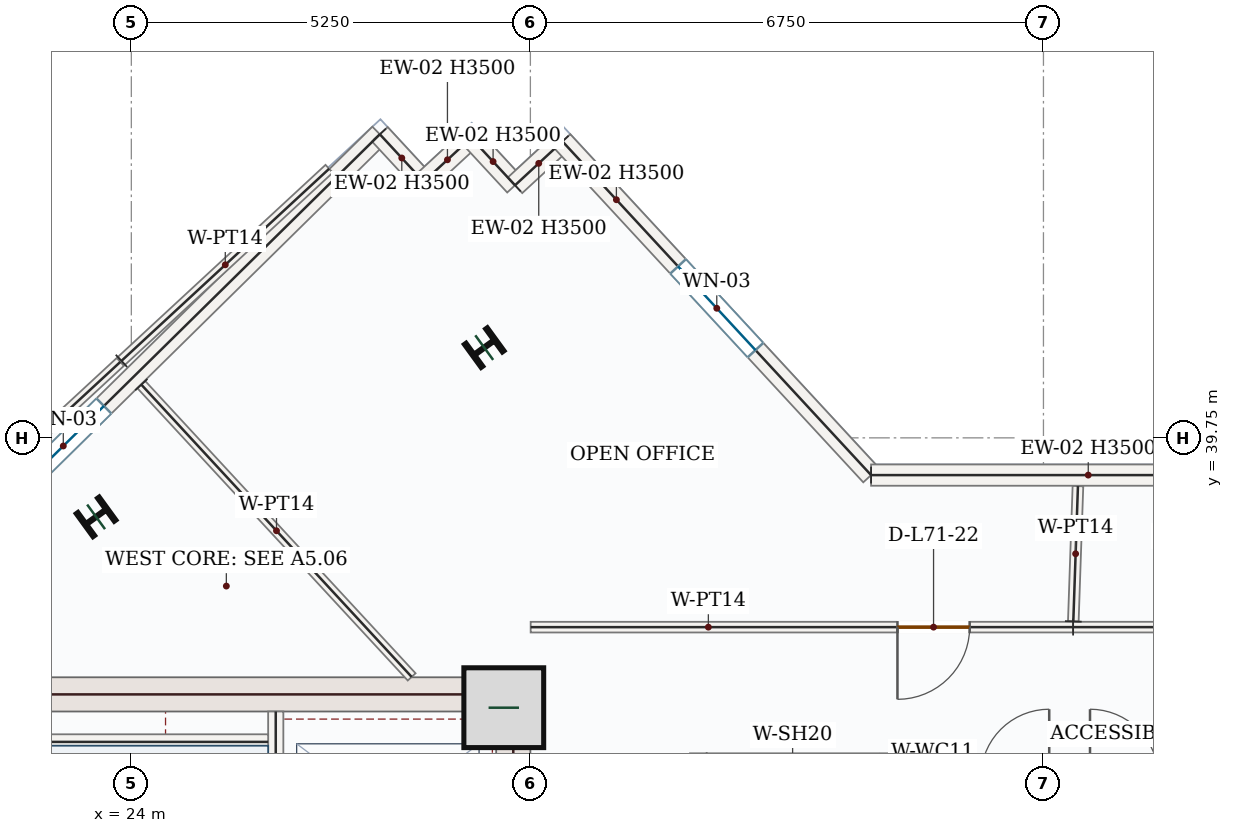
"""IFC4 building model, lengths in metres.
Left out: names, types, materials, properties, quantities, classifications, styles, units other than length and angle.
Written with IfcOpenShell. Run it as: python <this file> out.ifc"""

import sys

from ifc_helpers import new_model, si_unit, direction, frame, frame_2d, origin, origin_2d, place, context, subcontext, project, spatial, rectangle, i_section, extrude, source, transform, mapped, element, fill, save


model = new_model("IFC4")
c1 = context("Model", 3, precision=1e-05, world=origin(), true_north=direction((0.0, 1.0)))
c2 = subcontext(c1, "Body", "Model", "MODEL_VIEW")
j1 = project(units=[si_unit("LENGTHUNIT", "METRE"), si_unit("PLANEANGLEUNIT", "RADIAN")], contexts=[c1])
p1 = place(None, origin())
s1 = spatial("IfcSite", under=j1, at=p1, CompositionType="ELEMENT")
p2 = place(p1, origin())
s2 = spatial("IfcBuilding", under=s1, at=p2, CompositionType="ELEMENT")
p3 = place(p2, frame((0.0, 0.0, 295.35)))
s3 = spatial("IfcBuildingStorey", under=s2, at=p3, CompositionType="ELEMENT", Elevation=295.35)
p4 = place(p3, frame((29.025, 28.05, 0.0), z_axis=(0.0, 0.0, 1.0), x_axis=(0.0, 1.0, 0.0)))
e1 = element("IfcWall", 1, at=p4, inside=s3, PredefinedType="SHEAR", context=c2, shape_type="SweptSolid", body=[
    extrude(rectangle(XDim=8.55, YDim=0.45, at=frame_2d((4.275, 0.0))), origin(), (0.0, 0.0, 1.0), 3.5),
])
p5 = place(p4, frame((1.5, 0.0, 0.0)))
e2 = element("IfcOpeningElement", 2, at=p5, cuts=e1, PredefinedType="OPENING", context=c2, shape_type="SweptSolid", body=[
    extrude(rectangle(XDim=1.1, YDim=2.2, at=frame_2d((0.55, 1.1))), frame((0.0, 0.235, 0.0), z_axis=(0.0, -1.0, 0.0), x_axis=(1.0, 0.0, 0.0)), (0.0, 0.0, 1.0), 0.47),
])
m1 = source(origin(), c2, "Body", "SweptSolid", [
    extrude(rectangle(XDim=7.1, YDim=0.45, at=frame_2d((3.55, 0.0))), origin(), (0.0, 0.0, 1.0), 3.5),
])
p6 = place(p3, frame((21.7, 36.375, 0.0), z_axis=(0.0, 0.0, 1.0), x_axis=(1.0, 0.0, 0.0)))
e3 = element("IfcWall", 3, at=p6, inside=s3, PredefinedType="SHEAR", context=c2, shape_type="MappedRepresentation", body=[
    mapped(m1, transform((0.0, 0.0, 0.0), x_axis=(1.0, 0.0, 0.0), y_axis=(0.0, 1.0, 0.0), z_axis=(0.0, 0.0, 1.0), scale=1.0)),
])
m2 = source(origin(), c2, "Body", "SweptSolid", [
    extrude(rectangle(XDim=1.05, YDim=1.05, at=origin_2d()), origin(), (0.0, 0.0, 1.0), 3.75),
])
p7 = place(p3, frame((28.9, 36.2, 0.0), z_axis=(0.0, 0.0, 1.0), x_axis=(1.0, 0.0, 0.0)))
e4 = element("IfcColumn", 4, at=p7, inside=s3, PredefinedType="COLUMN", context=c2, shape_type="MappedRepresentation", body=[
    mapped(m2, transform((0.0, 0.0, 0.0), x_axis=(1.0, 0.0, 0.0), y_axis=(0.0, 1.0, 0.0), z_axis=(0.0, 0.0, 1.0), scale=1.0)),
])
m3 = source(origin(), c2, "Body", "SweptSolid", [
    extrude(i_section(OverallWidth=0.374, OverallDepth=0.372, WebThickness=0.016, FlangeThickness=0.026, FilletRadius=0.018, at=origin_2d()), origin(), (0.0, 0.0, 1.0), 3.75),
])
for number, where, z_axis, x_axis in (
    (5, (28.643, 40.937, 0.0), (0.0, 0.0, 1.0), (-0.588, 0.809, 0.0)),
    (6, (23.536, 38.711, 0.0), (0.0, 0.0, 1.0), (-0.588, 0.809, 0.0)),
):
    element("IfcColumn", number, at=place(p3, frame(where, z_axis=z_axis, x_axis=x_axis)), inside=s3, PredefinedType="COLUMN", context=c2, shape_type="MappedRepresentation", body=[
        mapped(m3, transform((0.0, 0.0, 0.0), x_axis=(1.0, 0.0, 0.0), y_axis=(0.0, 1.0, 0.0), z_axis=(0.0, 0.0, 1.0), scale=1.0)),
    ])
p8 = place(p3, frame((18.94, 35.542, 0.0), z_axis=(0.0, 0.0, 1.0), x_axis=(0.712557502542, 0.701613715353, 0.0)))
e7 = element("IfcWall", 7, at=p8, inside=s3, PredefinedType="SOLIDWALL", context=c2, shape_type="SweptSolid", body=[
    extrude(rectangle(XDim=11.69, YDim=0.28, at=frame_2d((5.845, 0.0))), origin(), (0.0, 0.0, 1.0), 3.5),
])
p9 = place(p8, frame((5.095, 0.0, 0.85)))
e8 = element("IfcOpeningElement", 8, at=p9, cuts=e7, PredefinedType="OPENING", context=c2, shape_type="SweptSolid", body=[
    extrude(rectangle(XDim=1.5, YDim=1.5, at=frame_2d((0.75, 0.75))), frame((0.0, 0.15, 0.0), z_axis=(0.0, -1.0, 0.0), x_axis=(1.0, 0.0, 0.0)), (0.0, 0.0, 1.0), 0.3),
])
m4 = source(origin(), c2, "Body", "SweptSolid", [
    extrude(rectangle(XDim=0.85, YDim=0.28, at=frame_2d((0.425, 0.0))), origin(), (0.0, 0.0, 1.0), 3.5),
])
for number, where, z_axis, x_axis in (
    (9, (27.27, 43.744, 0.0), (0.0, 0.0, 1.0), (0.679, -0.734, 0.0)),
    (10, (27.847, 43.12, 0.0), (0.0, 0.0, 1.0), (0.734, 0.679, 0.0)),
    (11, (28.471, 43.697, 0.0), (0.0, 0.0, 1.0), (0.679, -0.734, 0.0)),
):
    element("IfcWall", number, at=place(p3, frame(where, z_axis=z_axis, x_axis=x_axis)), inside=s3, PredefinedType="SOLIDWALL", context=c2, shape_type="MappedRepresentation", body=[
        mapped(m4, transform((0.0, 0.0, 0.0), x_axis=(1.0, 0.0, 0.0), y_axis=(0.0, 1.0, 0.0), z_axis=(0.0, 0.0, 1.0), scale=1.0)),
    ])
m5 = source(origin(), c2, "Body", "SweptSolid", [
    extrude(rectangle(XDim=0.85, YDim=0.28, at=frame_2d((0.425, 0.0))), origin(), (0.0, 0.0, 1.0), 3.5),
])
p10 = place(p3, frame((29.048, 43.073, 0.0), z_axis=(0.0, 0.0, 1.0), x_axis=(0.73428557742, 0.678840696183, 0.0)))
e12 = element("IfcWall", 12, at=p10, inside=s3, PredefinedType="SOLIDWALL", context=c2, shape_type="MappedRepresentation", body=[
    mapped(m5, transform((0.0, 0.0, 0.0), x_axis=(1.0, 0.0, 0.0), y_axis=(0.0, 1.0, 0.0), z_axis=(0.0, 0.0, 1.0), scale=1.0)),
])
p11 = place(p3, frame((29.672, 43.65, 0.0), z_axis=(0.0, 0.0, 1.0), x_axis=(0.679010627727, -0.734128440693, 0.0)))
e13 = element("IfcWall", 13, at=p11, inside=s3, PredefinedType="SOLIDWALL", context=c2, shape_type="SweptSolid", body=[
    extrude(rectangle(XDim=5.98, YDim=0.28, at=frame_2d((2.99, 0.0))), origin(), (0.0, 0.0, 1.0), 3.5),
])
p12 = place(p11, frame((2.24, 0.0, 0.85)))
e14 = element("IfcOpeningElement", 14, at=p12, cuts=e13, PredefinedType="OPENING", context=c2, shape_type="SweptSolid", body=[
    extrude(rectangle(XDim=1.5, YDim=1.5, at=frame_2d((0.75, 0.75))), frame((0.0, 0.15, 0.0), z_axis=(0.0, -1.0, 0.0), x_axis=(1.0, 0.0, 0.0)), (0.0, 0.0, 1.0), 0.3),
])
m6 = source(origin(), c2, "Body", "SweptSolid", [
    extrude(rectangle(XDim=5.714, YDim=0.28, at=frame_2d((2.857, 0.0))), origin(), (0.0, 0.0, 1.0), 3.5),
])
p13 = place(p3, frame((33.732, 39.26, 0.0), z_axis=(0.0, 0.0, 1.0), x_axis=(1.0, 0.0, 0.0)))
e15 = element("IfcWall", 15, at=p13, inside=s3, PredefinedType="SOLIDWALL", context=c2, shape_type="MappedRepresentation", body=[
    mapped(m6, transform((0.0, 0.0, 0.0), x_axis=(1.0, 0.0, 0.0), y_axis=(0.0, 1.0, 0.0), z_axis=(0.0, 0.0, 1.0), scale=1.0)),
])
p14 = place(p3, frame((25.9, 28.15, 0.0), z_axis=(0.0, 0.0, 1.0), x_axis=(0.0, 1.0, 0.0)))
e16 = element("IfcWall", 16, at=p14, inside=s3, PredefinedType="SOLIDWALL", context=c2, shape_type="SweptSolid", body=[
    extrude(rectangle(XDim=8.0, YDim=0.2, at=frame_2d((4.0, 0.0))), origin(), (0.0, 0.0, 1.0), 3.5),
])
p15 = place(p14, frame((0.4, 0.0, 0.0)))
e17 = element("IfcOpeningElement", 17, at=p15, cuts=e16, PredefinedType="OPENING", context=c2, shape_type="SweptSolid", body=[
    extrude(rectangle(XDim=1.05, YDim=2.15, at=frame_2d((0.525, 1.075))), frame((0.0, 0.11, 0.0), z_axis=(0.0, -1.0, 0.0), x_axis=(1.0, 0.0, 0.0)), (0.0, 0.0, 1.0), 0.22),
])
m7 = source(origin(), c2, "Body", "SweptSolid", [
    extrude(rectangle(XDim=3.25, YDim=0.2, at=frame_2d((1.625, 0.0))), origin(), (0.0, 0.0, 1.0), 3.5),
])
p16 = place(p3, frame((22.55, 35.75, 0.0), z_axis=(0.0, 0.0, 1.0), x_axis=(1.0, 0.0, 0.0)))
e18 = element("IfcWall", 18, at=p16, inside=s3, PredefinedType="SOLIDWALL", context=c2, shape_type="MappedRepresentation", body=[
    mapped(m7, transform((0.0, 0.0, 0.0), x_axis=(1.0, 0.0, 0.0), y_axis=(0.0, 1.0, 0.0), z_axis=(0.0, 0.0, 1.0), scale=1.0)),
])
p17 = place(p3, frame((31.45, 33.2, 0.0), z_axis=(0.0, 0.0, 1.0), x_axis=(0.0, 1.0, 0.0)))
e19 = element("IfcWall", 19, at=p17, inside=s3, PredefinedType="SOLIDWALL", context=c2, shape_type="SweptSolid", body=[
    extrude(rectangle(XDim=2.4, YDim=0.2, at=frame_2d((1.2, 0.0))), origin(), (0.0, 0.0, 1.0), 3.5),
])
p18 = place(p17, frame((0.65, 0.0, 0.0)))
e20 = element("IfcOpeningElement", 20, at=p18, cuts=e19, PredefinedType="OPENING", context=c2, shape_type="SweptSolid", body=[
    extrude(rectangle(XDim=1.1, YDim=2.15, at=frame_2d((0.55, 1.075))), frame((0.0, 0.11, 0.0), z_axis=(0.0, -1.0, 0.0), x_axis=(1.0, 0.0, 0.0)), (0.0, 0.0, 1.0), 0.22),
])
m8 = source(origin(), c2, "Body", "SweptSolid", [
    extrude(rectangle(XDim=2.4, YDim=0.2, at=frame_2d((1.2, 0.0))), origin(), (0.0, 0.0, 1.0), 3.5),
])
p19 = place(p3, frame((33.95, 33.2, 0.0), z_axis=(0.0, 0.0, 1.0), x_axis=(0.0, 1.0, 0.0)))
e21 = element("IfcWall", 21, at=p19, inside=s3, PredefinedType="SOLIDWALL", context=c2, shape_type="MappedRepresentation", body=[
    mapped(m8, transform((0.0, 0.0, 0.0), x_axis=(1.0, 0.0, 0.0), y_axis=(0.0, 1.0, 0.0), z_axis=(0.0, 0.0, 1.0), scale=1.0)),
])
m9 = source(origin(), c2, "Body", "SweptSolid", [
    extrude(rectangle(XDim=5.5, YDim=0.14, at=frame_2d((2.75, 0.0))), origin(), (0.0, 0.0, 1.0), 3.5),
])
p20 = place(p3, frame((19.818, 37.015, 0.0), z_axis=(0.0, 0.0, 1.0), x_axis=(0.734137611872, 0.679000711954, 0.0)))
e22 = element("IfcWall", 22, at=p20, inside=s3, PredefinedType="PARTITIONING", context=c2, shape_type="MappedRepresentation", body=[
    mapped(m9, transform((0.0, 0.0, 0.0), x_axis=(1.0, 0.0, 0.0), y_axis=(0.0, 1.0, 0.0), z_axis=(0.0, 0.0, 1.0), scale=1.0)),
])
m10 = source(origin(), c2, "Body", "SweptSolid", [
    extrude(rectangle(XDim=5.238, YDim=0.14, at=frame_2d((2.619, 0.0))), origin(), (0.0, 0.0, 1.0), 3.5),
])
p21 = place(p3, frame((24.132, 40.45, 0.0), z_axis=(0.0, 0.0, 1.0), x_axis=(0.67899802156, -0.734140100197, 0.0)))
e23 = element("IfcWall", 23, at=p21, inside=s3, PredefinedType="PARTITIONING", context=c2, shape_type="MappedRepresentation", body=[
    mapped(m10, transform((0.0, 0.0, 0.0), x_axis=(1.0, 0.0, 0.0), y_axis=(0.0, 1.0, 0.0), z_axis=(0.0, 0.0, 1.0), scale=1.0)),
])
p22 = place(p3, frame((42.742, 37.26, 0.0), z_axis=(0.0, 0.0, 1.0), x_axis=(-0.999999999261, 3.8433452e-05, 0.0)))
e24 = element("IfcWall", 24, at=p22, inside=s3, PredefinedType="PARTITIONING", context=c2, shape_type="SweptSolid", body=[
    extrude(rectangle(XDim=6.352, YDim=0.14, at=frame_2d((3.176, 0.0))), origin(), (0.0, 0.0, 1.0), 3.5),
])
p23 = place(p22, frame((4.214, 0.0, 0.0)))
e25 = element("IfcOpeningElement", 25, at=p23, cuts=e24, PredefinedType="OPENING", context=c2, shape_type="SweptSolid", body=[
    extrude(rectangle(XDim=0.95, YDim=2.15, at=frame_2d((0.475, 1.075))), frame((0.0, 0.08, 0.0), z_axis=(0.0, -1.0, 0.0), x_axis=(1.0, 0.0, 0.0)), (0.0, 0.0, 1.0), 0.16),
])
m11 = source(origin(), c2, "Body", "SweptSolid", [
    extrude(rectangle(XDim=1.781, YDim=0.14, at=frame_2d((0.891, 0.0))), origin(), (0.0, 0.0, 1.0), 3.5),
])
p24 = place(p3, frame((36.393, 37.335, 0.0), z_axis=(0.0, 0.0, 1.0), x_axis=(0.034268709891, 0.999412655274, 0.0)))
e26 = element("IfcWall", 26, at=p24, inside=s3, PredefinedType="PARTITIONING", context=c2, shape_type="MappedRepresentation", body=[
    mapped(m11, transform((0.0, 0.0, 0.0), x_axis=(1.0, 0.0, 0.0), y_axis=(0.0, 1.0, 0.0), z_axis=(0.0, 0.0, 1.0), scale=1.0)),
])
m12 = source(origin(), c2, "Body", "SweptSolid", [
    extrude(rectangle(XDim=3.722, YDim=0.14, at=frame_2d((1.861, 0.0))), origin(), (0.0, 0.0, 1.0), 3.5),
])
p25 = place(p3, frame((23.87, 40.763, 0.0), z_axis=(0.0, 0.0, 1.0), x_axis=(0.734119057589, 0.679020772352, 0.0)))
e27 = element("IfcWall", 27, at=p25, inside=s3, PredefinedType="PARTITIONING", context=c2, shape_type="MappedRepresentation", body=[
    mapped(m12, transform((0.0, 0.0, 0.0), x_axis=(1.0, 0.0, 0.0), y_axis=(0.0, 1.0, 0.0), z_axis=(0.0, 0.0, 1.0), scale=1.0)),
])
p26 = place(p3, frame((36.39, 37.26, 0.0), z_axis=(0.0, 0.0, 1.0), x_axis=(-0.999999997659, -6.8420512e-05, 0.0)))
e28 = element("IfcWall", 28, at=p26, inside=s3, PredefinedType="PARTITIONING", context=c2, shape_type="SweptSolid", body=[
    extrude(rectangle(XDim=7.136, YDim=0.14, at=frame_2d((3.568, 0.0))), origin(), (0.0, 0.0, 1.0), 3.5),
])
p27 = place(p26, frame((1.361, 0.0, 0.0)))
e29 = element("IfcOpeningElement", 29, at=p27, cuts=e28, PredefinedType="OPENING", context=c2, shape_type="SweptSolid", body=[
    extrude(rectangle(XDim=0.95, YDim=2.15, at=frame_2d((0.475, 1.075))), frame((0.0, 0.08, 0.0), z_axis=(0.0, -1.0, 0.0), x_axis=(1.0, 0.0, 0.0)), (0.0, 0.0, 1.0), 0.16),
])
m13 = source(origin(), c2, "Body", "SweptSolid", [
    extrude(rectangle(XDim=1.5, YDim=1.5, at=frame_2d((0.75, 0.75))), frame((0.0, 0.03, 0.0), z_axis=(0.0, -1.0, 0.0), x_axis=(1.0, 0.0, 0.0)), (0.0, 0.0, 1.0), 0.06),
])
p28 = place(p9, origin())
e30 = element("IfcWindow", 30, at=p28, inside=s3, PartitioningType="SINGLE_PANEL", PredefinedType="WINDOW", context=c2, shape_type="MappedRepresentation", body=[
    mapped(m13, transform((0.0, 0.0, 0.0), x_axis=(1.0, 0.0, 0.0), y_axis=(0.0, 1.0, 0.0), z_axis=(0.0, 0.0, 1.0), scale=1.0)),
])
fill(e8, e30)
p29 = place(p12, origin())
e31 = element("IfcWindow", 31, at=p29, inside=s3, PartitioningType="SINGLE_PANEL", PredefinedType="WINDOW", context=c2, shape_type="MappedRepresentation", body=[
    mapped(m13, transform((0.0, 0.0, 0.0), x_axis=(1.0, 0.0, 0.0), y_axis=(0.0, 1.0, 0.0), z_axis=(0.0, 0.0, 1.0), scale=1.0)),
])
fill(e14, e31)
m14 = source(origin(), c2, "Body", "SweptSolid", [
    extrude(rectangle(XDim=0.95, YDim=2.15, at=frame_2d((0.475, 1.075))), frame((0.0, 0.025, 0.0), z_axis=(0.0, -1.0, 0.0), x_axis=(1.0, 0.0, 0.0)), (0.0, 0.0, 1.0), 0.05),
])
p30 = place(p27, origin())
e32 = element("IfcDoor", 32, at=p30, inside=s3, OperationType="SINGLE_SWING_RIGHT", PredefinedType="DOOR", context=c2, shape_type="MappedRepresentation", body=[
    mapped(m14, transform((0.0, 0.0, 0.0), x_axis=(1.0, 0.0, 0.0), y_axis=(0.0, 1.0, 0.0), z_axis=(0.0, 0.0, 1.0), scale=1.0)),
])
fill(e29, e32)
save(model, sys.argv[1])
